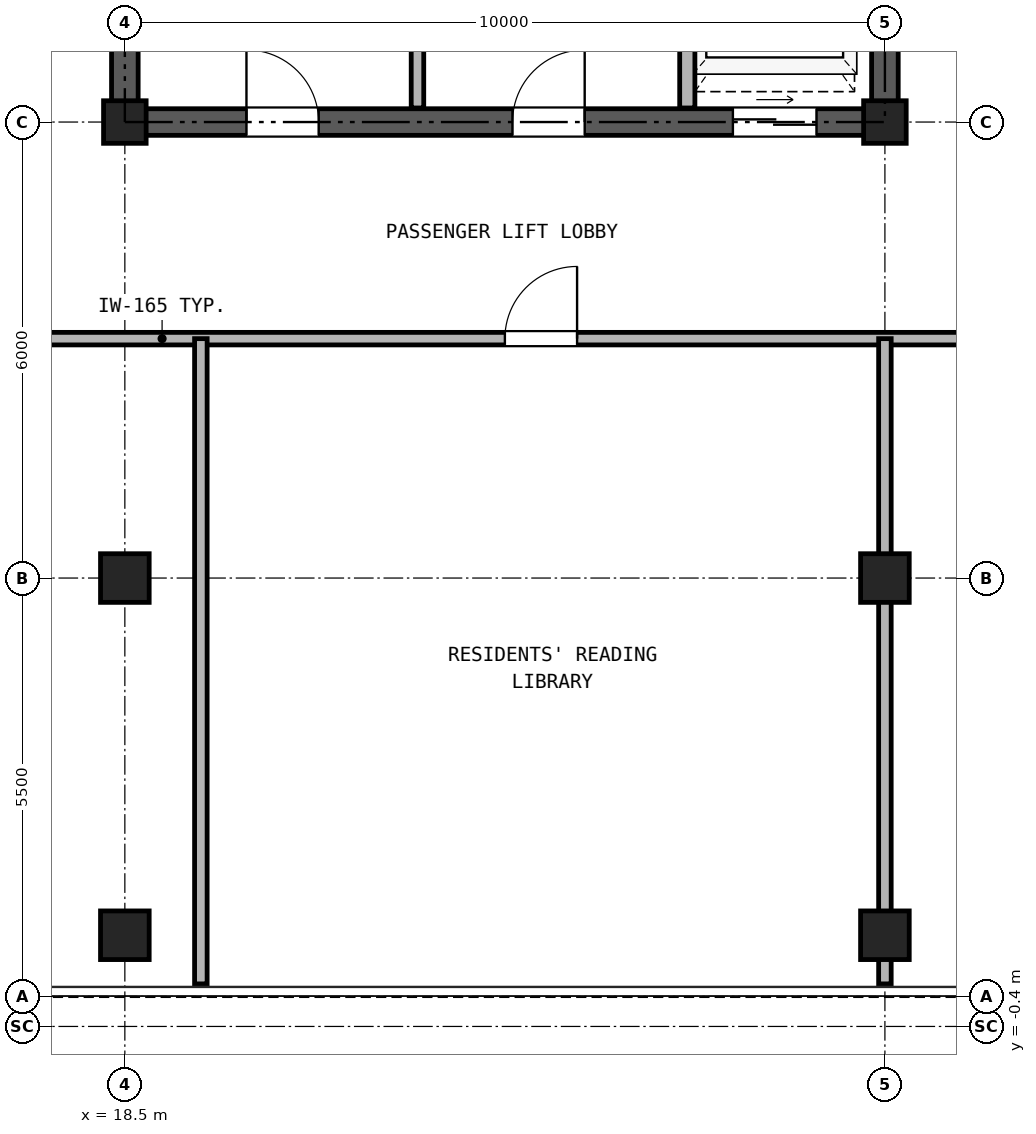
"""IFC4 building model, lengths in metres.
Left out: names, types, materials, properties, quantities, classifications, styles, units other than length and angle.
Written with IfcOpenShell. Run it as: python <this file> out.ifc"""

import sys

from ifc_helpers import new_model, si_unit, direction, frame, frame_2d, origin, origin_2d, place, context, subcontext, project, spatial, rectangle, hollow_rectangle, extrude, source, transform, mapped, element, fill, save


model = new_model("IFC4")
c1 = context("Model", 3, precision=1e-05, world=origin(), true_north=direction((0.0, 1.0)))
c2 = subcontext(c1, "Body", "Model", "MODEL_VIEW")
j1 = project(units=[si_unit("LENGTHUNIT", "METRE"), si_unit("PLANEANGLEUNIT", "RADIAN")], contexts=[c1])
p1 = place(None, origin())
s1 = spatial("IfcSite", under=j1, at=p1, CompositionType="ELEMENT")
p2 = place(p1, origin())
s2 = spatial("IfcBuilding", under=s1, at=p2, CompositionType="ELEMENT")
p3 = place(p2, frame((0.0, 0.0, 229.7)))
s3 = spatial("IfcBuildingStorey", under=s2, at=p3, CompositionType="ELEMENT", Elevation=229.7)
m1 = source(origin(), c2, "Body", "SweptSolid", [
    extrude(hollow_rectangle(XDim=0.64, YDim=0.64, WallThickness=0.035, at=origin_2d()), origin(), (0.0, 0.0, 1.0), 2.98),
])
for number, where, z_axis, x_axis in (
    (1, (18.5, 0.8, 0.0), (0.0, 0.0, 1.0), (1.0, 0.0, 0.0)),
    (2, (28.5, 0.8, 0.0), (0.0, 0.0, 1.0), (1.0, 0.0, 0.0)),
    (3, (18.5, 5.5, 0.0), (0.0, 0.0, 1.0), (1.0, 0.0, 0.0)),
):
    element("IfcColumn", number, at=place(p3, frame(where, z_axis=z_axis, x_axis=x_axis)), inside=s3, PredefinedType="COLUMN", context=c2, shape_type="MappedRepresentation", body=[
        mapped(m1, transform((0.0, 0.0, 0.0), x_axis=(1.0, 0.0, 0.0), y_axis=(0.0, 1.0, 0.0), z_axis=(0.0, 0.0, 1.0), scale=1.0)),
    ])
m2 = source(origin(), c2, "Body", "SweptSolid", [
    extrude(hollow_rectangle(XDim=0.56, YDim=0.56, WallThickness=0.03, at=origin_2d()), origin(), (0.0, 0.0, 1.0), 2.98),
])
p4 = place(p3, frame((18.5, 11.5, 0.0), z_axis=(0.0, 0.0, 1.0), x_axis=(1.0, 0.0, 0.0)))
e4 = element("IfcColumn", 4, at=p4, inside=s3, PredefinedType="COLUMN", context=c2, shape_type="MappedRepresentation", body=[
    mapped(m2, transform((0.0, 0.0, 0.0), x_axis=(1.0, 0.0, 0.0), y_axis=(0.0, 1.0, 0.0), z_axis=(0.0, 0.0, 1.0), scale=1.0)),
])
p5 = place(p3, frame((28.5, 5.5, 0.0), z_axis=(0.0, 0.0, 1.0), x_axis=(1.0, 0.0, 0.0)))
e5 = element("IfcColumn", 5, at=p5, inside=s3, PredefinedType="COLUMN", context=c2, shape_type="MappedRepresentation", body=[
    mapped(m1, transform((0.0, 0.0, 0.0), x_axis=(1.0, 0.0, 0.0), y_axis=(0.0, 1.0, 0.0), z_axis=(0.0, 0.0, 1.0), scale=1.0)),
])
p6 = place(p3, frame((28.5, 11.5, 0.0), z_axis=(0.0, 0.0, 1.0), x_axis=(1.0, 0.0, 0.0)))
e6 = element("IfcColumn", 6, at=p6, inside=s3, PredefinedType="COLUMN", context=c2, shape_type="MappedRepresentation", body=[
    mapped(m2, transform((0.0, 0.0, 0.0), x_axis=(1.0, 0.0, 0.0), y_axis=(0.0, 1.0, 0.0), z_axis=(0.0, 0.0, 1.0), scale=1.0)),
])
p7 = place(p3, frame((18.325, 11.5, 0.0), z_axis=(0.0, 0.0, 1.0), x_axis=(1.0, 0.0, 0.0)))
e7 = element("IfcWall", 7, at=p7, inside=s3, PredefinedType="SHEAR", context=c2, shape_type="SweptSolid", body=[
    extrude(rectangle(XDim=10.35, YDim=0.35, at=frame_2d((5.175, 0.0))), origin(), (0.0, 0.0, 1.0), 2.98),
])
p8 = place(p7, frame((1.775, 0.0, 0.0)))
e8 = element("IfcOpeningElement", 8, at=p8, cuts=e7, PredefinedType="OPENING", context=c2, shape_type="SweptSolid", body=[
    extrude(rectangle(XDim=0.95, YDim=2.15, at=frame_2d((0.475, 1.075))), frame((0.0, 0.185, 0.0), z_axis=(0.0, -1.0, 0.0), x_axis=(1.0, 0.0, 0.0)), (0.0, 0.0, 1.0), 0.37),
])
p9 = place(p7, frame((5.275, 0.0, 0.0)))
e9 = element("IfcOpeningElement", 9, at=p9, cuts=e7, PredefinedType="OPENING", context=c2, shape_type="SweptSolid", body=[
    extrude(rectangle(XDim=0.95, YDim=2.15, at=frame_2d((0.475, 1.075))), frame((0.0, 0.185, 0.0), z_axis=(0.0, -1.0, 0.0), x_axis=(1.0, 0.0, 0.0)), (0.0, 0.0, 1.0), 0.37),
])
p10 = place(p7, frame((8.175, 0.0, 0.0)))
e10 = element("IfcOpeningElement", 10, at=p10, cuts=e7, PredefinedType="OPENING", context=c2, shape_type="SweptSolid", body=[
    extrude(rectangle(XDim=1.1, YDim=2.25, at=frame_2d((0.55, 1.125))), frame((0.0, 0.185, 0.0), z_axis=(0.0, -1.0, 0.0), x_axis=(1.0, 0.0, 0.0)), (0.0, 0.0, 1.0), 0.37),
])
p11 = place(p3, frame((18.5, 11.675, 0.0), z_axis=(0.0, 0.0, 1.0), x_axis=(0.0, 1.0, 0.0)))
e11 = element("IfcWall", 11, at=p11, inside=s3, PredefinedType="SHEAR", context=c2, shape_type="SweptSolid", body=[
    extrude(rectangle(XDim=16.9, YDim=0.35, at=frame_2d((8.45, 0.0))), origin(), (0.0, 0.0, 1.0), 2.98),
])
p12 = place(p11, frame((7.475, 0.0, 0.0)))
e12 = element("IfcOpeningElement", 12, at=p12, cuts=e11, PredefinedType="OPENING", context=c2, shape_type="SweptSolid", body=[
    extrude(rectangle(XDim=1.15, YDim=2.2, at=frame_2d((0.575, 1.1))), frame((0.0, 0.185, 0.0), z_axis=(0.0, -1.0, 0.0), x_axis=(1.0, 0.0, 0.0)), (0.0, 0.0, 1.0), 0.37),
])
p13 = place(p3, frame((28.5, 11.675, 0.0), z_axis=(0.0, 0.0, 1.0), x_axis=(0.0, 1.0, 0.0)))
e13 = element("IfcWall", 13, at=p13, inside=s3, PredefinedType="SHEAR", context=c2, shape_type="SweptSolid", body=[
    extrude(rectangle(XDim=16.9, YDim=0.35, at=frame_2d((8.45, 0.0))), origin(), (0.0, 0.0, 1.0), 2.98),
])
p14 = place(p13, frame((7.475, 0.0, 0.0)))
e14 = element("IfcOpeningElement", 14, at=p14, cuts=e13, PredefinedType="OPENING", context=c2, shape_type="SweptSolid", body=[
    extrude(rectangle(XDim=1.15, YDim=2.2, at=frame_2d((0.575, 1.1))), frame((0.0, 0.185, 0.0), z_axis=(0.0, -1.0, 0.0), x_axis=(1.0, 0.0, 0.0)), (0.0, 0.0, 1.0), 0.37),
])
p15 = place(p3, frame((22.35, 11.685, 0.0), z_axis=(0.0, 0.0, 1.0), x_axis=(0.0, 1.0, 0.0)))
e15 = element("IfcWall", 15, at=p15, inside=s3, PredefinedType="PARTITIONING", context=c2, shape_type="SweptSolid", body=[
    extrude(rectangle(XDim=3.315, YDim=0.165, at=frame_2d((1.657, 0.0))), origin(), (0.0, 0.0, 1.0), 2.98),
])
p16 = place(p3, frame((25.9, 11.685, 0.0), z_axis=(0.0, 0.0, 1.0), x_axis=(0.0, 1.0, 0.0)))
e16 = element("IfcWall", 16, at=p16, inside=s3, PredefinedType="PARTITIONING", context=c2, shape_type="SweptSolid", body=[
    extrude(rectangle(XDim=3.315, YDim=0.2, at=frame_2d((1.657, 0.0))), origin(), (0.0, 0.0, 1.0), 2.98),
])
p17 = place(p3, frame((5.36, 8.65, 0.0), z_axis=(0.0, 0.0, 1.0), x_axis=(1.0, 0.0, 0.0)))
e17 = element("IfcWall", 17, at=p17, inside=s3, PredefinedType="PARTITIONING", context=c2, shape_type="SweptSolid", body=[
    extrude(rectangle(XDim=36.28, YDim=0.165, at=frame_2d((18.14, 0.0))), origin(), (0.0, 0.0, 1.0), 2.655),
])
p18 = place(p17, frame((8.17, 0.0, 0.0)))
e18 = element("IfcOpeningElement", 18, at=p18, cuts=e17, PredefinedType="OPENING", context=c2, shape_type="SweptSolid", body=[
    extrude(rectangle(XDim=0.95, YDim=2.15, at=frame_2d((0.475, 1.075))), frame((0.0, 0.093, 0.0), z_axis=(0.0, -1.0, 0.0), x_axis=(1.0, 0.0, 0.0)), (0.0, 0.0, 1.0), 0.185),
])
p19 = place(p17, frame((18.14, 0.0, 0.0)))
e19 = element("IfcOpeningElement", 19, at=p19, cuts=e17, PredefinedType="OPENING", context=c2, shape_type="SweptSolid", body=[
    extrude(rectangle(XDim=0.95, YDim=2.15, at=frame_2d((0.475, 1.075))), frame((0.0, 0.093, 0.0), z_axis=(0.0, -1.0, 0.0), x_axis=(1.0, 0.0, 0.0)), (0.0, 0.0, 1.0), 0.185),
])
p20 = place(p17, frame((25.14, 0.0, 0.0)))
e20 = element("IfcOpeningElement", 20, at=p20, cuts=e17, PredefinedType="OPENING", context=c2, shape_type="SweptSolid", body=[
    extrude(rectangle(XDim=0.95, YDim=2.15, at=frame_2d((0.475, 1.075))), frame((0.0, 0.093, 0.0), z_axis=(0.0, -1.0, 0.0), x_axis=(1.0, 0.0, 0.0)), (0.0, 0.0, 1.0), 0.185),
])
p21 = place(p17, frame((29.99, 0.0, 0.0)))
e21 = element("IfcOpeningElement", 21, at=p21, cuts=e17, PredefinedType="OPENING", context=c2, shape_type="SweptSolid", body=[
    extrude(rectangle(XDim=0.95, YDim=2.15, at=frame_2d((0.475, 1.075))), frame((0.0, 0.093, 0.0), z_axis=(0.0, -1.0, 0.0), x_axis=(1.0, 0.0, 0.0)), (0.0, 0.0, 1.0), 0.185),
])
p22 = place(p3, frame((19.5, 0.16, 0.0), z_axis=(0.0, 0.0, 1.0), x_axis=(0.0, 1.0, 0.0)))
e22 = element("IfcWall", 22, at=p22, inside=s3, PredefinedType="PARTITIONING", context=c2, shape_type="SweptSolid", body=[
    extrude(rectangle(XDim=8.49, YDim=0.165, at=frame_2d((4.245, 0.0))), origin(), (0.0, 0.0, 1.0), 2.98),
])
p23 = place(p3, frame((28.5, 0.16, 0.0), z_axis=(0.0, 0.0, 1.0), x_axis=(0.0, 1.0, 0.0)))
e23 = element("IfcWall", 23, at=p23, inside=s3, PredefinedType="PARTITIONING", context=c2, shape_type="SweptSolid", body=[
    extrude(rectangle(XDim=8.49, YDim=0.165, at=frame_2d((4.245, 0.0))), origin(), (0.0, 0.0, 1.0), 2.428),
])
p24 = place(p8, frame((0.95, 0.0, 0.0), z_axis=(0.0, 0.0, 1.0), x_axis=(-1.0, 0.0, 0.0)))
e24 = element("IfcDoor", 24, at=p24, inside=s3, OperationType="SINGLE_SWING_LEFT", PredefinedType="DOOR", context=c2, shape_type="SweptSolid", body=[
    extrude(rectangle(XDim=0.95, YDim=2.15, at=frame_2d((0.475, 1.075))), frame((0.0, 0.025, 0.0), z_axis=(0.0, -1.0, 0.0), x_axis=(1.0, 0.0, 0.0)), (0.0, 0.0, 1.0), 0.05),
])
fill(e8, e24)
p25 = place(p9, frame((0.95, 0.0, 0.0), z_axis=(0.0, 0.0, 1.0), x_axis=(-1.0, 0.0, 0.0)))
e25 = element("IfcDoor", 25, at=p25, inside=s3, OperationType="SINGLE_SWING_RIGHT", PredefinedType="DOOR", context=c2, shape_type="SweptSolid", body=[
    extrude(rectangle(XDim=0.95, YDim=2.15, at=frame_2d((0.475, 1.075))), frame((0.0, 0.025, 0.0), z_axis=(0.0, -1.0, 0.0), x_axis=(1.0, 0.0, 0.0)), (0.0, 0.0, 1.0), 0.05),
])
fill(e9, e25)
p26 = place(p10, frame((1.1, 0.0, 0.0), z_axis=(0.0, 0.0, 1.0), x_axis=(-1.0, 0.0, 0.0)))
e26 = element("IfcDoor", 26, at=p26, inside=s3, OperationType="DOUBLE_DOOR_SLIDING", PredefinedType="DOOR", context=c2, shape_type="SweptSolid", body=[
    extrude(rectangle(XDim=1.1, YDim=2.25, at=frame_2d((0.55, 1.125))), frame((0.0, 0.025, 0.0), z_axis=(0.0, -1.0, 0.0), x_axis=(1.0, 0.0, 0.0)), (0.0, 0.0, 1.0), 0.05),
])
fill(e10, e26)
p27 = place(p19, frame((0.95, 0.0, 0.0), z_axis=(0.0, 0.0, 1.0), x_axis=(-1.0, 0.0, 0.0)))
e27 = element("IfcDoor", 27, at=p27, inside=s3, OperationType="SINGLE_SWING_RIGHT", PredefinedType="DOOR", context=c2, shape_type="SweptSolid", body=[
    extrude(rectangle(XDim=0.95, YDim=2.15, at=frame_2d((0.475, 1.075))), frame((0.0, 0.025, 0.0), z_axis=(0.0, -1.0, 0.0), x_axis=(1.0, 0.0, 0.0)), (0.0, 0.0, 1.0), 0.05),
])
fill(e19, e27)
save(model, sys.argv[1])
